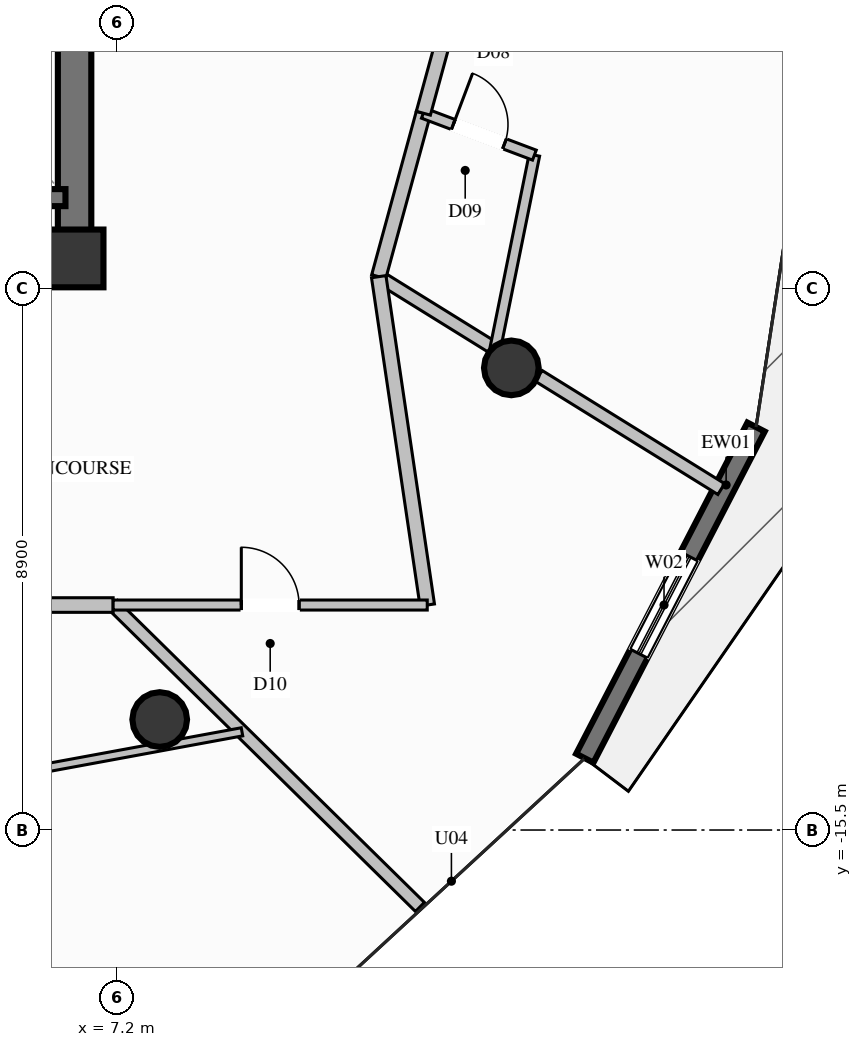
"""IFC4 building model, lengths in metres.
Left out: names, types, materials, properties, quantities, classifications, styles, units other than length and angle.
Written with IfcOpenShell. Run it as: python <this file> out.ifc"""

import sys

from ifc_helpers import new_model, si_unit, direction, frame, frame_2d, origin, origin_2d, place, context, subcontext, project, spatial, rectangle, circle, extrude, element, fill, save


model = new_model("IFC4")
c1 = context("Model", 3, precision=1e-05, world=origin(), true_north=direction((0.0, 1.0)))
c2 = subcontext(c1, "Body", "Model", "MODEL_VIEW")
j1 = project(units=[si_unit("LENGTHUNIT", "METRE"), si_unit("PLANEANGLEUNIT", "RADIAN")], contexts=[c1])
p1 = place(None, origin())
s1 = spatial("IfcSite", under=j1, at=p1, CompositionType="ELEMENT")
p2 = place(p1, origin())
s2 = spatial("IfcBuilding", under=s1, at=p2, CompositionType="ELEMENT")
p3 = place(p2, frame((0.0, 0.0, 184.0)))
s3 = spatial("IfcBuildingStorey", under=s2, at=p3, CompositionType="ELEMENT", Elevation=184.0)
p4 = place(p3, frame((6.5, -6.1, 0.0), z_axis=(0.0, 0.0, 1.0), x_axis=(1.0, 0.0, 0.0)))
e1 = element("IfcColumn", 1, at=p4, inside=s3, PredefinedType="COLUMN", context=c2, shape_type="SweptSolid", body=[
    extrude(rectangle(XDim=0.95, YDim=0.95, at=origin_2d()), origin(), (0.0, 0.0, 1.0), 3.6),
])
p5 = place(p3, frame((4.15, -6.1, 0.0), z_axis=(0.0, 0.0, 1.0), x_axis=(1.0, 0.0, 0.0)))
e2 = element("IfcWall", 2, at=p5, inside=s3, PredefinedType="SHEAR", context=c2, shape_type="SweptSolid", body=[
    extrude(rectangle(XDim=2.075, YDim=0.55, at=frame_2d((1.038, 0.0))), origin(), (0.0, 0.0, 1.0), 3.6),
])
p6 = place(p3, frame((6.5, -6.375, 0.0), z_axis=(0.0, 0.0, 1.0), x_axis=(0.0, 1.0, 0.0)))
e3 = element("IfcWall", 3, at=p6, inside=s3, PredefinedType="SHEAR", context=c2, shape_type="SweptSolid", body=[
    extrude(rectangle(XDim=4.025, YDim=0.55, at=frame_2d((2.012, 0.0))), origin(), (0.0, 0.0, 1.0), 3.6),
])
for number, where, z_axis, x_axis in (
    (4, (7.9, -13.683, 0.0), (0.0, 0.0, 1.0), (1.0, 0.0, 0.0)),
    (5, (13.683, -7.9, 0.0), (0.0, 0.0, 1.0), (1.0, 0.0, 0.0)),
):
    element("IfcColumn", number, at=place(p3, frame(where, z_axis=z_axis, x_axis=x_axis)), inside=s3, PredefinedType="COLUMN", context=c2, shape_type="SweptSolid", body=[
        extrude(circle(Radius=0.45, at=origin_2d()), origin(), (0.0, 0.0, 1.0), 3.6),
    ])
p7 = place(p3, frame((17.708, -8.873, 0.0), z_axis=(0.0, 0.0, 1.0), x_axis=(-0.459419669187, -0.888219324021, 0.0)))
e6 = element("IfcWall", 6, at=p7, inside=s3, PredefinedType="SOLIDWALL", context=c2, shape_type="SweptSolid", body=[
    extrude(rectangle(XDim=6.131, YDim=0.32, at=frame_2d((3.066, 0.0))), origin(), (0.0, 0.0, 1.0), 3.36),
])
p8 = place(p7, frame((2.395, 0.0, 0.35)))
e7 = element("IfcOpeningElement", 7, at=p8, cuts=e6, PredefinedType="OPENING", context=c2, shape_type="SweptSolid", body=[
    extrude(rectangle(XDim=1.8, YDim=2.6, at=frame_2d((0.9, 1.3))), frame((0.0, 0.17, 0.0), z_axis=(0.0, -1.0, 0.0), x_axis=(1.0, 0.0, 0.0)), (0.0, 0.0, 1.0), 0.34),
])
p9 = place(p3, frame((4.15, -5.1, 0.0), z_axis=(0.0, 0.0, 1.0), x_axis=(1.0, 0.0, 0.0)))
e8 = element("IfcWall", 8, at=p9, inside=s3, PredefinedType="SOLIDWALL", context=c2, shape_type="SweptSolid", body=[
    extrude(rectangle(XDim=2.2, YDim=0.28, at=frame_2d((1.1, 0.0))), origin(), (0.0, 0.0, 1.0), 3.36),
])
p10 = place(p3, frame((11.502, -6.4, 0.0), z_axis=(0.0, 0.0, 1.0), x_axis=(0.849789901528, -0.527121545054, 0.0)))
e9 = element("IfcWall", 9, at=p10, inside=s3, PredefinedType="PARTITIONING", context=c2, shape_type="SweptSolid", body=[
    extrude(rectangle(XDim=2.191, YDim=0.21, at=frame_2d((1.096, 0.0))), origin(), (0.0, 0.0, 1.0), 2.877),
])
p11 = place(p3, frame((14.134, -8.032, 0.0), z_axis=(0.0, 0.0, 1.0), x_axis=(0.849841998218, -0.527037549009, 0.0)))
e10 = element("IfcWall", 10, at=p11, inside=s3, PredefinedType="PARTITIONING", context=c2, shape_type="SweptSolid", body=[
    extrude(rectangle(XDim=3.531, YDim=0.21, at=frame_2d((1.766, 0.0))), origin(), (0.0, 0.0, 1.0), 3.36),
])
p12 = place(p3, frame((11.502, -6.4, 0.0), z_axis=(0.0, 0.0, 1.0), x_axis=(0.263465836707, 0.964668727019, 0.0)))
e11 = element("IfcWall", 11, at=p12, inside=s3, PredefinedType="PARTITIONING", context=c2, shape_type="SweptSolid", body=[
    extrude(rectangle(XDim=2.786, YDim=0.24, at=frame_2d((1.393, 0.0))), origin(), (0.0, 0.0, 1.0), 3.36),
])
p13 = place(p3, frame((13.417, -7.588, 0.0), z_axis=(0.0, 0.0, 1.0), x_axis=(0.198368094192, 0.98012759333, 0.0)))
e12 = element("IfcWall", 12, at=p13, inside=s3, PredefinedType="PLUMBINGWALL", context=c2, shape_type="SweptSolid", body=[
    extrude(rectangle(XDim=3.252, YDim=0.175, at=frame_2d((1.626, 0.0))), origin(), (0.0, 0.0, 1.0), 2.929),
])
p14 = place(p3, frame((12.236, -3.712, 0.0), z_axis=(0.0, 0.0, 1.0), x_axis=(0.935612633934, -0.353028326375, 0.0)))
e13 = element("IfcWall", 13, at=p14, inside=s3, PredefinedType="PLUMBINGWALL", context=c2, shape_type="SweptSolid", body=[
    extrude(rectangle(XDim=1.952, YDim=0.175, at=frame_2d((0.976, 0.0))), origin(), (0.0, 0.0, 1.0), 3.36),
])
p15 = place(p14, frame((0.526, 0.0, 0.0)))
e14 = element("IfcOpeningElement", 14, at=p15, cuts=e13, PredefinedType="OPENING", context=c2, shape_type="SweptSolid", body=[
    extrude(rectangle(XDim=0.9, YDim=2.1, at=frame_2d((0.45, 1.05))), frame((0.0, 0.098, 0.0), z_axis=(0.0, -1.0, 0.0), x_axis=(1.0, 0.0, 0.0)), (0.0, 0.0, 1.0), 0.195),
])
p16 = place(p3, frame((12.236, -3.712, 0.0), z_axis=(0.0, 0.0, 1.0), x_axis=(0.263498559894, 0.964659789218, 0.0)))
e15 = element("IfcWall", 15, at=p16, inside=s3, PredefinedType="PARTITIONING", context=c2, shape_type="SweptSolid", body=[
    extrude(rectangle(XDim=3.848, YDim=0.24, at=frame_2d((1.924, 0.0))), origin(), (0.0, 0.0, 1.0), 3.36),
])
p17 = place(p16, frame((1.374, 0.0, 0.0)))
e16 = element("IfcOpeningElement", 16, at=p17, cuts=e15, PredefinedType="OPENING", context=c2, shape_type="SweptSolid", body=[
    extrude(rectangle(XDim=1.1, YDim=2.3, at=frame_2d((0.55, 1.15))), frame((0.0, 0.13, 0.0), z_axis=(0.0, -1.0, 0.0), x_axis=(1.0, 0.0, 0.0)), (0.0, 0.0, 1.0), 0.26),
])
p18 = place(p3, frame((7.134, -11.8, 0.0), z_axis=(0.0, 0.0, 1.0), x_axis=(0.712808698232, -0.701358510125, 0.0)))
e17 = element("IfcWall", 17, at=p18, inside=s3, PredefinedType="PARTITIONING", context=c2, shape_type="SweptSolid", body=[
    extrude(rectangle(XDim=7.079, YDim=0.21, at=frame_2d((3.54, 0.0))), origin(), (0.0, 0.0, 1.0), 3.36),
])
p19 = place(p3, frame((0.0, -11.8, 0.0), z_axis=(0.0, 0.0, 1.0), x_axis=(1.0, 0.0, 0.0)))
e18 = element("IfcWall", 18, at=p19, inside=s3, PredefinedType="PARTITIONING", context=c2, shape_type="SweptSolid", body=[
    extrude(rectangle(XDim=7.134, YDim=0.24, at=frame_2d((3.567, 0.0))), origin(), (0.0, 0.0, 1.0), 3.36),
])
p20 = place(p3, frame((0.182, -15.555, 0.0), z_axis=(0.0, 0.0, 1.0), x_axis=(0.983473659369, 0.181051267126, 0.0)))
e19 = element("IfcWall", 19, at=p20, inside=s3, PredefinedType="PARTITIONING", context=c2, shape_type="SweptSolid", body=[
    extrude(rectangle(XDim=9.223, YDim=0.135, at=frame_2d((4.612, 0.0))), origin(), (0.0, 0.0, 1.0), 2.929),
])
p21 = place(p20, frame((4.137, 0.0, 0.0)))
e20 = element("IfcOpeningElement", 20, at=p21, cuts=e19, PredefinedType="OPENING", context=c2, shape_type="SweptSolid", body=[
    extrude(rectangle(XDim=0.95, YDim=2.1, at=frame_2d((0.475, 1.05))), frame((0.0, 0.078, 0.0), z_axis=(0.0, -1.0, 0.0), x_axis=(1.0, 0.0, 0.0)), (0.0, 0.0, 1.0), 0.155),
])
p22 = place(p3, frame((12.3, -11.8, 0.0), z_axis=(0.0, 0.0, 1.0), x_axis=(-0.146203405363, 0.98925454978, 0.0)))
e21 = element("IfcWall", 21, at=p22, inside=s3, PredefinedType="PARTITIONING", context=c2, shape_type="SweptSolid", body=[
    extrude(rectangle(XDim=5.459, YDim=0.24, at=frame_2d((2.729, 0.0))), origin(), (0.0, 0.0, 1.0), 3.36),
])
p23 = place(p3, frame((7.134, -11.8, 0.0), z_axis=(0.0, 0.0, 1.0), x_axis=(1.0, 0.0, 0.0)))
e22 = element("IfcWall", 22, at=p23, inside=s3, PredefinedType="PARTITIONING", context=c2, shape_type="SweptSolid", body=[
    extrude(rectangle(XDim=5.166, YDim=0.165, at=frame_2d((2.583, 0.0))), origin(), (0.0, 0.0, 1.0), 3.36),
])
p24 = place(p23, frame((2.108, 0.0, 0.0)))
e23 = element("IfcOpeningElement", 23, at=p24, cuts=e22, PredefinedType="OPENING", context=c2, shape_type="SweptSolid", body=[
    extrude(rectangle(XDim=0.95, YDim=2.1, at=frame_2d((0.475, 1.05))), frame((0.0, 0.093, 0.0), z_axis=(0.0, -1.0, 0.0), x_axis=(1.0, 0.0, 0.0)), (0.0, 0.0, 1.0), 0.185),
])
p25 = place(p8, origin())
e24 = element("IfcWindow", 24, at=p25, inside=s3, PartitioningType="SINGLE_PANEL", PredefinedType="WINDOW", context=c2, shape_type="SweptSolid", body=[
    extrude(rectangle(XDim=1.8, YDim=2.6, at=frame_2d((0.9, 1.3))), frame((0.0, 0.03, 0.0), z_axis=(0.0, -1.0, 0.0), x_axis=(1.0, 0.0, 0.0)), (0.0, 0.0, 1.0), 0.06),
])
fill(e7, e24)
p26 = place(p15, origin())
e25 = element("IfcDoor", 25, at=p26, inside=s3, OperationType="SINGLE_SWING_LEFT", PredefinedType="DOOR", context=c2, shape_type="SweptSolid", body=[
    extrude(rectangle(XDim=0.9, YDim=2.1, at=frame_2d((0.45, 1.05))), frame((0.0, 0.025, 0.0), z_axis=(0.0, -1.0, 0.0), x_axis=(1.0, 0.0, 0.0)), (0.0, 0.0, 1.0), 0.05),
])
fill(e14, e25)
p27 = place(p24, origin())
e26 = element("IfcDoor", 26, at=p27, inside=s3, OperationType="SINGLE_SWING_LEFT", PredefinedType="DOOR", context=c2, shape_type="SweptSolid", body=[
    extrude(rectangle(XDim=0.95, YDim=2.1, at=frame_2d((0.475, 1.05))), frame((0.0, 0.025, 0.0), z_axis=(0.0, -1.0, 0.0), x_axis=(1.0, 0.0, 0.0)), (0.0, 0.0, 1.0), 0.05),
])
fill(e23, e26)
save(model, sys.argv[1])
